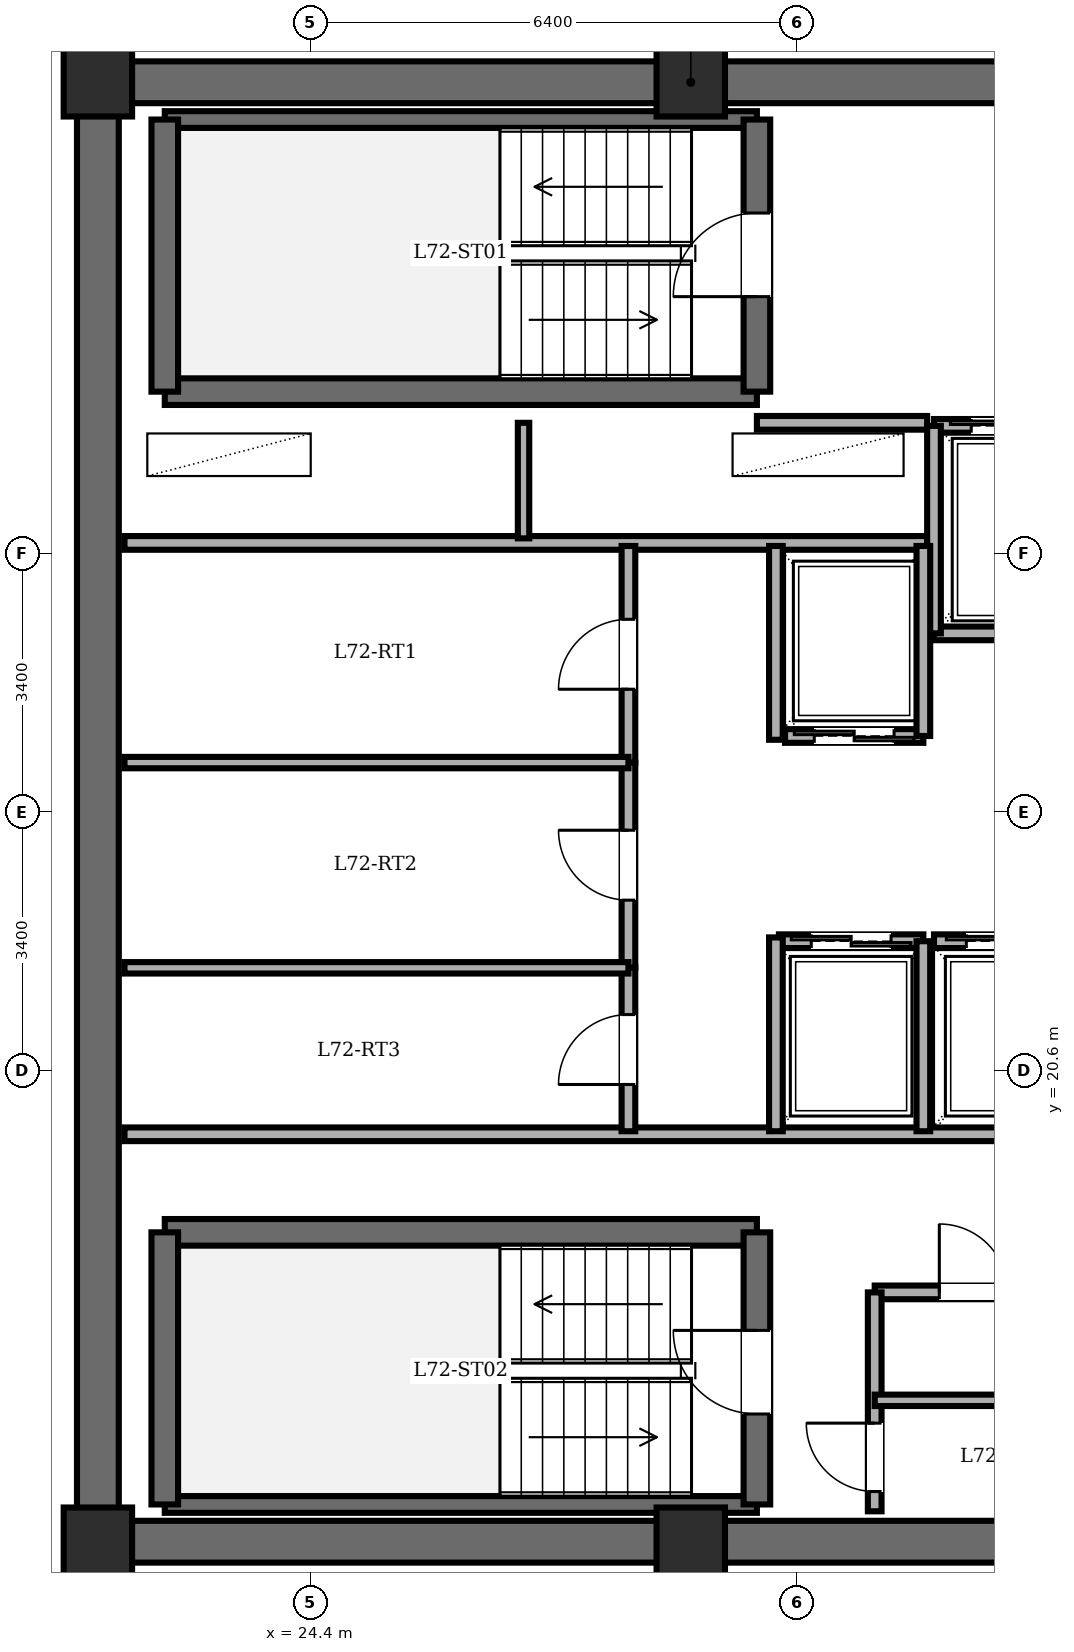
"""IFC4 building model, lengths in metres.
Left out: names, types, materials, properties, quantities, classifications, styles, units other than length and angle.
Written with IfcOpenShell. Run it as: python <this file> out.ifc"""

import sys

from ifc_helpers import new_model, si_unit, direction, frame, frame_2d, origin, origin_2d, place, context, subcontext, project, spatial, rectangle, extrude, element, fill, save


model = new_model("IFC4")
c1 = context("Model", 3, precision=1e-05, world=origin(), true_north=direction((0.0, 1.0)))
c2 = subcontext(c1, "Body", "Model", "MODEL_VIEW")
j1 = project(units=[si_unit("LENGTHUNIT", "METRE"), si_unit("PLANEANGLEUNIT", "RADIAN")], contexts=[c1])
p1 = place(None, origin())
s1 = spatial("IfcSite", under=j1, at=p1, CompositionType="ELEMENT")
p2 = place(p1, origin())
s2 = spatial("IfcBuilding", under=s1, at=p2, CompositionType="ELEMENT")
p3 = place(p2, frame((0.0, 0.0, 277.05)))
s3 = spatial("IfcBuildingStorey", under=s2, at=p3, CompositionType="ELEMENT", Elevation=277.05)
for number, where, z_axis, x_axis in (
    (1, (21.6, 14.4, 0.0), (0.0, 0.0, 1.0), (1.0, 0.0, 0.0)),
    (2, (29.4, 14.4, 0.0), (0.0, 0.0, 1.0), (1.0, 0.0, 0.0)),
    (3, (29.4, 33.6, 0.0), (0.0, 0.0, 1.0), (1.0, 0.0, 0.0)),
    (4, (21.6, 33.6, 0.0), (0.0, 0.0, 1.0), (1.0, 0.0, 0.0)),
):
    element("IfcColumn", number, at=place(p3, frame(where, z_axis=z_axis, x_axis=x_axis)), inside=s3, PredefinedType="COLUMN", context=c2, shape_type="SweptSolid", body=[
        extrude(rectangle(XDim=0.9, YDim=0.9, at=origin_2d()), origin(), (0.0, 0.0, 1.0), 3.65),
    ])
p4 = place(p3, frame((21.6, 14.4, 0.0), z_axis=(0.0, 0.0, 1.0), x_axis=(0.0, 1.0, 0.0)))
e5 = element("IfcWall", 5, at=p4, inside=s3, PredefinedType="SHEAR", context=c2, shape_type="SweptSolid", body=[
    extrude(rectangle(XDim=19.2, YDim=0.55, at=frame_2d((9.6, 0.0))), origin(), (0.0, 0.0, 1.0), 3.45),
])
for number, where, z_axis, x_axis in (
    (6, (21.6, 33.6, 0.0), (0.0, 0.0, 1.0), (1.0, 0.0, 0.0)),
    (7, (37.2, 14.4, 0.0), (0.0, 0.0, 1.0), (-1.0, 0.0, 0.0)),
):
    element("IfcWall", number, at=place(p3, frame(where, z_axis=z_axis, x_axis=x_axis)), inside=s3, PredefinedType="SHEAR", context=c2, shape_type="SweptSolid", body=[
        extrude(rectangle(XDim=15.6, YDim=0.55, at=frame_2d((7.8, 0.0))), origin(), (0.0, 0.0, 1.0), 3.45),
    ])
p5 = place(p3, frame((22.48, 29.53, 0.0), z_axis=(0.0, 0.0, 1.0), x_axis=(1.0, 0.0, 0.0)))
e8 = element("IfcWall", 8, at=p5, inside=s3, PredefinedType="SOLIDWALL", context=c2, shape_type="SweptSolid", body=[
    extrude(rectangle(XDim=7.79, YDim=0.35, at=frame_2d((3.895, 0.0))), origin(), (0.0, 0.0, 1.0), 3.45),
])
p6 = place(p3, frame((22.48, 33.11, 0.0), z_axis=(0.0, 0.0, 1.0), x_axis=(1.0, 0.0, 0.0)))
e9 = element("IfcWall", 9, at=p6, inside=s3, PredefinedType="PARTITIONING", context=c2, shape_type="SweptSolid", body=[
    extrude(rectangle(XDim=7.79, YDim=0.22, at=frame_2d((3.895, 0.0))), origin(), (0.0, 0.0, 1.0), 3.45),
])
p7 = place(p3, frame((22.48, 29.53, 0.0), z_axis=(0.0, 0.0, 1.0), x_axis=(0.0, 1.0, 0.0)))
e10 = element("IfcWall", 10, at=p7, inside=s3, PredefinedType="SOLIDWALL", context=c2, shape_type="SweptSolid", body=[
    extrude(rectangle(XDim=3.58, YDim=0.35, at=frame_2d((1.79, 0.0))), origin(), (0.0, 0.0, 1.0), 3.45),
])
p8 = place(p3, frame((30.27, 29.53, 0.0), z_axis=(0.0, 0.0, 1.0), x_axis=(0.0, 1.0, 0.0)))
e11 = element("IfcWall", 11, at=p8, inside=s3, PredefinedType="SOLIDWALL", context=c2, shape_type="SweptSolid", body=[
    extrude(rectangle(XDim=3.58, YDim=0.35, at=frame_2d((1.79, 0.0))), origin(), (0.0, 0.0, 1.0), 3.45),
])
p9 = place(p8, frame((1.25, 0.0, 0.0)))
e12 = element("IfcOpeningElement", 12, at=p9, cuts=e11, PredefinedType="OPENING", context=c2, shape_type="SweptSolid", body=[
    extrude(rectangle(XDim=1.1, YDim=2.15, at=frame_2d((0.55, 1.075))), frame((0.0, 0.185, 0.0), z_axis=(0.0, -1.0, 0.0), x_axis=(1.0, 0.0, 0.0)), (0.0, 0.0, 1.0), 0.37),
])
p10 = place(p3, frame((22.48, 18.47, 0.0), z_axis=(0.0, 0.0, 1.0), x_axis=(1.0, 0.0, 0.0)))
e13 = element("IfcWall", 13, at=p10, inside=s3, PredefinedType="SOLIDWALL", context=c2, shape_type="SweptSolid", body=[
    extrude(rectangle(XDim=7.79, YDim=0.35, at=frame_2d((3.895, 0.0))), origin(), (0.0, 0.0, 1.0), 3.45),
])
p11 = place(p3, frame((22.48, 14.89, 0.0), z_axis=(0.0, 0.0, 1.0), x_axis=(1.0, 0.0, 0.0)))
e14 = element("IfcWall", 14, at=p11, inside=s3, PredefinedType="PARTITIONING", context=c2, shape_type="SweptSolid", body=[
    extrude(rectangle(XDim=7.79, YDim=0.22, at=frame_2d((3.895, 0.0))), origin(), (0.0, 0.0, 1.0), 3.45),
])
p12 = place(p3, frame((22.48, 14.89, 0.0), z_axis=(0.0, 0.0, 1.0), x_axis=(0.0, 1.0, 0.0)))
e15 = element("IfcWall", 15, at=p12, inside=s3, PredefinedType="SOLIDWALL", context=c2, shape_type="SweptSolid", body=[
    extrude(rectangle(XDim=3.58, YDim=0.35, at=frame_2d((1.79, 0.0))), origin(), (0.0, 0.0, 1.0), 3.45),
])
p13 = place(p3, frame((30.27, 14.89, 0.0), z_axis=(0.0, 0.0, 1.0), x_axis=(0.0, 1.0, 0.0)))
e16 = element("IfcWall", 16, at=p13, inside=s3, PredefinedType="SOLIDWALL", context=c2, shape_type="SweptSolid", body=[
    extrude(rectangle(XDim=3.58, YDim=0.35, at=frame_2d((1.79, 0.0))), origin(), (0.0, 0.0, 1.0), 3.45),
])
p14 = place(p13, frame((1.19, 0.0, 0.0)))
e17 = element("IfcOpeningElement", 17, at=p14, cuts=e16, PredefinedType="OPENING", context=c2, shape_type="SweptSolid", body=[
    extrude(rectangle(XDim=1.1, YDim=2.15, at=frame_2d((0.55, 1.075))), frame((0.0, 0.185, 0.0), z_axis=(0.0, -1.0, 0.0), x_axis=(1.0, 0.0, 0.0)), (0.0, 0.0, 1.0), 0.37),
])
p15 = place(p3, frame((30.27, 29.12, 0.0), z_axis=(0.0, 0.0, 1.0), x_axis=(1.0, 0.0, 0.0)))
e18 = element("IfcWall", 18, at=p15, inside=s3, PredefinedType="PARTITIONING", context=c2, shape_type="SweptSolid", body=[
    extrude(rectangle(XDim=2.24, YDim=0.18, at=frame_2d((1.12, 0.0))), origin(), (0.0, 0.0, 1.0), 3.45),
])
p16 = place(p3, frame((21.95, 27.54, 0.0), z_axis=(0.0, 0.0, 1.0), x_axis=(1.0, 0.0, 0.0)))
e19 = element("IfcWall", 19, at=p16, inside=s3, PredefinedType="PARTITIONING", context=c2, shape_type="SweptSolid", body=[
    extrude(rectangle(XDim=10.56, YDim=0.18, at=frame_2d((5.28, 0.0))), origin(), (0.0, 0.0, 1.0), 3.45),
])
p17 = place(p3, frame((27.2, 27.6, 0.0), z_axis=(0.0, 0.0, 1.0), x_axis=(0.0, 1.0, 0.0)))
e20 = element("IfcWall", 20, at=p17, inside=s3, PredefinedType="PARTITIONING", context=c2, shape_type="SweptSolid", body=[
    extrude(rectangle(XDim=1.52, YDim=0.15, at=frame_2d((0.76, 0.0))), origin(), (0.0, 0.0, 1.0), 3.45),
])
p18 = place(p3, frame((21.95, 19.76, 0.0), z_axis=(0.0, 0.0, 1.0), x_axis=(1.0, 0.0, 0.0)))
e21 = element("IfcWall", 21, at=p18, inside=s3, PredefinedType="PARTITIONING", context=c2, shape_type="SweptSolid", body=[
    extrude(rectangle(XDim=14.87, YDim=0.18, at=frame_2d((7.435, 0.0))), origin(), (0.0, 0.0, 1.0), 3.45),
])
p19 = place(p3, frame((31.82, 17.68, 0.0), z_axis=(0.0, 0.0, 1.0), x_axis=(1.0, 0.0, 0.0)))
e22 = element("IfcWall", 22, at=p19, inside=s3, PredefinedType="PARTITIONING", context=c2, shape_type="SweptSolid", body=[
    extrude(rectangle(XDim=2.66, YDim=0.18, at=frame_2d((1.33, 0.0))), origin(), (0.0, 0.0, 1.0), 3.45),
])
p20 = place(p19, frame((0.85, 0.0, 0.0)))
e23 = element("IfcOpeningElement", 23, at=p20, cuts=e22, PredefinedType="OPENING", context=c2, shape_type="SweptSolid", body=[
    extrude(rectangle(XDim=0.9, YDim=2.05, at=frame_2d((0.45, 1.025))), frame((0.0, 0.1, 0.0), z_axis=(0.0, -1.0, 0.0), x_axis=(1.0, 0.0, 0.0)), (0.0, 0.0, 1.0), 0.2),
])
p21 = place(p3, frame((31.82, 14.8, 0.0), z_axis=(0.0, 0.0, 1.0), x_axis=(0.0, 1.0, 0.0)))
e24 = element("IfcWall", 24, at=p21, inside=s3, PredefinedType="PARTITIONING", context=c2, shape_type="SweptSolid", body=[
    extrude(rectangle(XDim=2.88, YDim=0.18, at=frame_2d((1.44, 0.0))), origin(), (0.0, 0.0, 1.0), 3.45),
])
p22 = place(p21, frame((0.26, 0.0, 0.0)))
e25 = element("IfcOpeningElement", 25, at=p22, cuts=e24, PredefinedType="OPENING", context=c2, shape_type="SweptSolid", body=[
    extrude(rectangle(XDim=0.9, YDim=2.05, at=frame_2d((0.45, 1.025))), frame((0.0, 0.1, 0.0), z_axis=(0.0, -1.0, 0.0), x_axis=(1.0, 0.0, 0.0)), (0.0, 0.0, 1.0), 0.2),
])
p23 = place(p3, frame((31.82, 16.26, 0.0), z_axis=(0.0, 0.0, 1.0), x_axis=(1.0, 0.0, 0.0)))
e26 = element("IfcWall", 26, at=p23, inside=s3, PredefinedType="PARTITIONING", context=c2, shape_type="SweptSolid", body=[
    extrude(rectangle(XDim=2.66, YDim=0.15, at=frame_2d((1.33, 0.0))), origin(), (0.0, 0.0, 1.0), 3.45),
])
p24 = place(p3, frame((32.6, 29.08, 0.0), z_axis=(0.0, 0.0, 1.0), x_axis=(1.0, 0.0, 0.0)))
e27 = element("IfcWall", 27, at=p24, inside=s3, PredefinedType="PARTITIONING", context=c2, shape_type="SweptSolid", body=[
    extrude(rectangle(XDim=2.08, YDim=0.18, at=frame_2d((1.04, 0.0))), origin(), (0.0, 0.0, 1.0), 3.45),
])
p25 = place(p24, frame((0.49, 0.0, 0.0)))
e28 = element("IfcOpeningElement", 28, at=p25, cuts=e27, PredefinedType="OPENING", context=c2, shape_type="SweptSolid", body=[
    extrude(rectangle(XDim=1.1, YDim=2.2, at=frame_2d((0.55, 1.1))), frame((0.0, 0.1, 0.0), z_axis=(0.0, -1.0, 0.0), x_axis=(1.0, 0.0, 0.0)), (0.0, 0.0, 1.0), 0.2),
])
p26 = place(p3, frame((34.68, 26.35, 0.0), z_axis=(0.0, 0.0, 1.0), x_axis=(-1.0, 0.0, 0.0)))
e29 = element("IfcWall", 29, at=p26, inside=s3, PredefinedType="PARTITIONING", context=c2, shape_type="SweptSolid", body=[
    extrude(rectangle(XDim=2.08, YDim=0.18, at=frame_2d((1.04, 0.0))), origin(), (0.0, 0.0, 1.0), 3.45),
])
p27 = place(p3, frame((32.6, 29.08, 0.0), z_axis=(0.0, 0.0, 1.0), x_axis=(0.0, -1.0, 0.0)))
e30 = element("IfcWall", 30, at=p27, inside=s3, PredefinedType="PARTITIONING", context=c2, shape_type="SweptSolid", body=[
    extrude(rectangle(XDim=2.73, YDim=0.18, at=frame_2d((1.365, 0.0))), origin(), (0.0, 0.0, 1.0), 3.45),
])
p28 = place(p3, frame((32.46, 25.0, 0.0), z_axis=(0.0, 0.0, 1.0), x_axis=(-1.0, 0.0, 0.0)))
e31 = element("IfcWall", 31, at=p28, inside=s3, PredefinedType="PARTITIONING", context=c2, shape_type="SweptSolid", body=[
    extrude(rectangle(XDim=1.82, YDim=0.18, at=frame_2d((0.91, 0.0))), origin(), (0.0, 0.0, 1.0), 3.45),
])
p29 = place(p28, frame((0.385, 0.0, 0.0)))
e32 = element("IfcOpeningElement", 32, at=p29, cuts=e31, PredefinedType="OPENING", context=c2, shape_type="SweptSolid", body=[
    extrude(rectangle(XDim=1.05, YDim=2.2, at=frame_2d((0.525, 1.1))), frame((0.0, 0.1, 0.0), z_axis=(0.0, -1.0, 0.0), x_axis=(1.0, 0.0, 0.0)), (0.0, 0.0, 1.0), 0.2),
])
p30 = place(p3, frame((32.46, 25.0, 0.0), z_axis=(0.0, 0.0, 1.0), x_axis=(0.0, 1.0, 0.0)))
e33 = element("IfcWall", 33, at=p30, inside=s3, PredefinedType="PARTITIONING", context=c2, shape_type="SweptSolid", body=[
    extrude(rectangle(XDim=2.5, YDim=0.18, at=frame_2d((1.25, 0.0))), origin(), (0.0, 0.0, 1.0), 3.45),
])
p31 = place(p3, frame((30.56, 22.3, 0.0), z_axis=(0.0, 0.0, 1.0), x_axis=(1.0, 0.0, 0.0)))
e34 = element("IfcWall", 34, at=p31, inside=s3, PredefinedType="PARTITIONING", context=c2, shape_type="SweptSolid", body=[
    extrude(rectangle(XDim=1.9, YDim=0.18, at=frame_2d((0.95, 0.0))), origin(), (0.0, 0.0, 1.0), 3.45),
])
p32 = place(p31, frame((0.425, 0.0, 0.0)))
e35 = element("IfcOpeningElement", 35, at=p32, cuts=e34, PredefinedType="OPENING", context=c2, shape_type="SweptSolid", body=[
    extrude(rectangle(XDim=1.05, YDim=2.2, at=frame_2d((0.525, 1.1))), frame((0.0, 0.1, 0.0), z_axis=(0.0, -1.0, 0.0), x_axis=(1.0, 0.0, 0.0)), (0.0, 0.0, 1.0), 0.2),
])
p33 = place(p3, frame((32.46, 19.8, 0.0), z_axis=(0.0, 0.0, 1.0), x_axis=(0.0, 1.0, 0.0)))
e36 = element("IfcWall", 36, at=p33, inside=s3, PredefinedType="PARTITIONING", context=c2, shape_type="SweptSolid", body=[
    extrude(rectangle(XDim=2.5, YDim=0.18, at=frame_2d((1.25, 0.0))), origin(), (0.0, 0.0, 1.0), 3.45),
])
p34 = place(p3, frame((32.6, 22.3, 0.0), z_axis=(0.0, 0.0, 1.0), x_axis=(1.0, 0.0, 0.0)))
e37 = element("IfcWall", 37, at=p34, inside=s3, PredefinedType="PARTITIONING", context=c2, shape_type="SweptSolid", body=[
    extrude(rectangle(XDim=1.9, YDim=0.18, at=frame_2d((0.95, 0.0))), origin(), (0.0, 0.0, 1.0), 3.45),
])
p35 = place(p34, frame((0.425, 0.0, 0.0)))
e38 = element("IfcOpeningElement", 38, at=p35, cuts=e37, PredefinedType="OPENING", context=c2, shape_type="SweptSolid", body=[
    extrude(rectangle(XDim=1.05, YDim=2.2, at=frame_2d((0.525, 1.1))), frame((0.0, 0.1, 0.0), z_axis=(0.0, -1.0, 0.0), x_axis=(1.0, 0.0, 0.0)), (0.0, 0.0, 1.0), 0.2),
])
for number, where, z_axis, x_axis in (
    (39, (30.52, 24.95, 0.0), (0.0, 0.0, 1.0), (0.0, 1.0, 0.0)),
    (40, (30.52, 19.8, 0.0), (0.0, 0.0, 1.0), (0.0, 1.0, 0.0)),
):
    element("IfcWall", number, at=place(p3, frame(where, z_axis=z_axis, x_axis=x_axis)), inside=s3, PredefinedType="PARTITIONING", context=c2, shape_type="SweptSolid", body=[
        extrude(rectangle(XDim=2.55, YDim=0.18, at=frame_2d((1.275, 0.0))), origin(), (0.0, 0.0, 1.0), 3.45),
    ])
p36 = place(p3, frame((28.58, 24.65, 0.0), z_axis=(0.0, 0.0, 1.0), x_axis=(0.0, 1.0, 0.0)))
e41 = element("IfcWall", 41, at=p36, inside=s3, PredefinedType="PARTITIONING", context=c2, shape_type="SweptSolid", body=[
    extrude(rectangle(XDim=2.85, YDim=0.18, at=frame_2d((1.425, 0.0))), origin(), (0.0, 0.0, 1.0), 3.45),
])
p37 = place(p36, frame((0.965, 0.0, 0.0)))
e42 = element("IfcOpeningElement", 42, at=p37, cuts=e41, PredefinedType="OPENING", context=c2, shape_type="SweptSolid", body=[
    extrude(rectangle(XDim=0.92, YDim=2.1, at=frame_2d((0.46, 1.05))), frame((0.0, 0.1, 0.0), z_axis=(0.0, -1.0, 0.0), x_axis=(1.0, 0.0, 0.0)), (0.0, 0.0, 1.0), 0.2),
])
p38 = place(p3, frame((28.58, 21.95, 0.0), z_axis=(0.0, 0.0, 1.0), x_axis=(0.0, 1.0, 0.0)))
e43 = element("IfcWall", 43, at=p38, inside=s3, PredefinedType="PARTITIONING", context=c2, shape_type="SweptSolid", body=[
    extrude(rectangle(XDim=2.7, YDim=0.18, at=frame_2d((1.35, 0.0))), origin(), (0.0, 0.0, 1.0), 3.45),
])
p39 = place(p38, frame((0.89, 0.0, 0.0)))
e44 = element("IfcOpeningElement", 44, at=p39, cuts=e43, PredefinedType="OPENING", context=c2, shape_type="SweptSolid", body=[
    extrude(rectangle(XDim=0.92, YDim=2.1, at=frame_2d((0.46, 1.05))), frame((0.0, 0.1, 0.0), z_axis=(0.0, -1.0, 0.0), x_axis=(1.0, 0.0, 0.0)), (0.0, 0.0, 1.0), 0.2),
])
p40 = place(p3, frame((28.58, 19.8, 0.0), z_axis=(0.0, 0.0, 1.0), x_axis=(0.0, 1.0, 0.0)))
e45 = element("IfcWall", 45, at=p40, inside=s3, PredefinedType="PARTITIONING", context=c2, shape_type="SweptSolid", body=[
    extrude(rectangle(XDim=2.15, YDim=0.18, at=frame_2d((1.075, 0.0))), origin(), (0.0, 0.0, 1.0), 3.45),
])
p41 = place(p40, frame((0.615, 0.0, 0.0)))
e46 = element("IfcOpeningElement", 46, at=p41, cuts=e45, PredefinedType="OPENING", context=c2, shape_type="SweptSolid", body=[
    extrude(rectangle(XDim=0.92, YDim=2.1, at=frame_2d((0.46, 1.05))), frame((0.0, 0.1, 0.0), z_axis=(0.0, -1.0, 0.0), x_axis=(1.0, 0.0, 0.0)), (0.0, 0.0, 1.0), 0.2),
])
for number, where, z_axis, x_axis in (
    (47, (21.95, 24.65, 0.0), (0.0, 0.0, 1.0), (1.0, 0.0, 0.0)),
    (48, (21.95, 21.95, 0.0), (0.0, 0.0, 1.0), (1.0, 0.0, 0.0)),
):
    element("IfcWall", number, at=place(p3, frame(where, z_axis=z_axis, x_axis=x_axis)), inside=s3, PredefinedType="PARTITIONING", context=c2, shape_type="SweptSolid", body=[
        extrude(rectangle(XDim=6.63, YDim=0.15, at=frame_2d((3.315, 0.0))), origin(), (0.0, 0.0, 1.0), 3.45),
    ])
p42 = place(p9, origin())
e49 = element("IfcDoor", 49, at=p42, inside=s3, OperationType="SINGLE_SWING_LEFT", PredefinedType="DOOR", context=c2, shape_type="SweptSolid", body=[
    extrude(rectangle(XDim=1.1, YDim=2.15, at=frame_2d((0.55, 1.075))), frame((0.0, 0.025, 0.0), z_axis=(0.0, -1.0, 0.0), x_axis=(1.0, 0.0, 0.0)), (0.0, 0.0, 1.0), 0.05),
])
fill(e12, e49)
p43 = place(p14, origin())
e50 = element("IfcDoor", 50, at=p43, inside=s3, OperationType="SINGLE_SWING_RIGHT", PredefinedType="DOOR", context=c2, shape_type="SweptSolid", body=[
    extrude(rectangle(XDim=1.1, YDim=2.15, at=frame_2d((0.55, 1.075))), frame((0.0, 0.025, 0.0), z_axis=(0.0, -1.0, 0.0), x_axis=(1.0, 0.0, 0.0)), (0.0, 0.0, 1.0), 0.05),
])
fill(e17, e50)
p44 = place(p20, origin())
e51 = element("IfcDoor", 51, at=p44, inside=s3, OperationType="SINGLE_SWING_LEFT", PredefinedType="DOOR", context=c2, shape_type="SweptSolid", body=[
    extrude(rectangle(XDim=0.9, YDim=2.05, at=frame_2d((0.45, 1.025))), frame((0.0, 0.025, 0.0), z_axis=(0.0, -1.0, 0.0), x_axis=(1.0, 0.0, 0.0)), (0.0, 0.0, 1.0), 0.05),
])
fill(e23, e51)
p45 = place(p22, origin())
e52 = element("IfcDoor", 52, at=p45, inside=s3, OperationType="SINGLE_SWING_RIGHT", PredefinedType="DOOR", context=c2, shape_type="SweptSolid", body=[
    extrude(rectangle(XDim=0.9, YDim=2.05, at=frame_2d((0.45, 1.025))), frame((0.0, 0.025, 0.0), z_axis=(0.0, -1.0, 0.0), x_axis=(1.0, 0.0, 0.0)), (0.0, 0.0, 1.0), 0.05),
])
fill(e25, e52)
p46 = place(p25, origin())
e53 = element("IfcDoor", 53, at=p46, inside=s3, OperationType="DOUBLE_DOOR_SLIDING", PredefinedType="DOOR", context=c2, shape_type="SweptSolid", body=[
    extrude(rectangle(XDim=1.1, YDim=2.2, at=frame_2d((0.55, 1.1))), frame((0.0, 0.025, 0.0), z_axis=(0.0, -1.0, 0.0), x_axis=(1.0, 0.0, 0.0)), (0.0, 0.0, 1.0), 0.05),
])
fill(e28, e53)
p47 = place(p29, origin())
e54 = element("IfcDoor", 54, at=p47, inside=s3, OperationType="DOUBLE_DOOR_SLIDING", PredefinedType="DOOR", context=c2, shape_type="SweptSolid", body=[
    extrude(rectangle(XDim=1.05, YDim=2.2, at=frame_2d((0.525, 1.1))), frame((0.0, 0.025, 0.0), z_axis=(0.0, -1.0, 0.0), x_axis=(1.0, 0.0, 0.0)), (0.0, 0.0, 1.0), 0.05),
])
fill(e32, e54)
p48 = place(p32, origin())
e55 = element("IfcDoor", 55, at=p48, inside=s3, OperationType="DOUBLE_DOOR_SLIDING", PredefinedType="DOOR", context=c2, shape_type="SweptSolid", body=[
    extrude(rectangle(XDim=1.05, YDim=2.2, at=frame_2d((0.525, 1.1))), frame((0.0, 0.025, 0.0), z_axis=(0.0, -1.0, 0.0), x_axis=(1.0, 0.0, 0.0)), (0.0, 0.0, 1.0), 0.05),
])
fill(e35, e55)
p49 = place(p35, origin())
e56 = element("IfcDoor", 56, at=p49, inside=s3, OperationType="DOUBLE_DOOR_SLIDING", PredefinedType="DOOR", context=c2, shape_type="SweptSolid", body=[
    extrude(rectangle(XDim=1.05, YDim=2.2, at=frame_2d((0.525, 1.1))), frame((0.0, 0.025, 0.0), z_axis=(0.0, -1.0, 0.0), x_axis=(1.0, 0.0, 0.0)), (0.0, 0.0, 1.0), 0.05),
])
fill(e38, e56)
p50 = place(p37, origin())
e57 = element("IfcDoor", 57, at=p50, inside=s3, OperationType="SINGLE_SWING_LEFT", PredefinedType="DOOR", context=c2, shape_type="SweptSolid", body=[
    extrude(rectangle(XDim=0.92, YDim=2.1, at=frame_2d((0.46, 1.05))), frame((0.0, 0.025, 0.0), z_axis=(0.0, -1.0, 0.0), x_axis=(1.0, 0.0, 0.0)), (0.0, 0.0, 1.0), 0.05),
])
fill(e42, e57)
p51 = place(p39, origin())
e58 = element("IfcDoor", 58, at=p51, inside=s3, OperationType="SINGLE_SWING_RIGHT", PredefinedType="DOOR", context=c2, shape_type="SweptSolid", body=[
    extrude(rectangle(XDim=0.92, YDim=2.1, at=frame_2d((0.46, 1.05))), frame((0.0, 0.025, 0.0), z_axis=(0.0, -1.0, 0.0), x_axis=(1.0, 0.0, 0.0)), (0.0, 0.0, 1.0), 0.05),
])
fill(e44, e58)
p52 = place(p41, origin())
e59 = element("IfcDoor", 59, at=p52, inside=s3, OperationType="SINGLE_SWING_LEFT", PredefinedType="DOOR", context=c2, shape_type="SweptSolid", body=[
    extrude(rectangle(XDim=0.92, YDim=2.1, at=frame_2d((0.46, 1.05))), frame((0.0, 0.025, 0.0), z_axis=(0.0, -1.0, 0.0), x_axis=(1.0, 0.0, 0.0)), (0.0, 0.0, 1.0), 0.05),
])
fill(e46, e59)
save(model, sys.argv[1])
